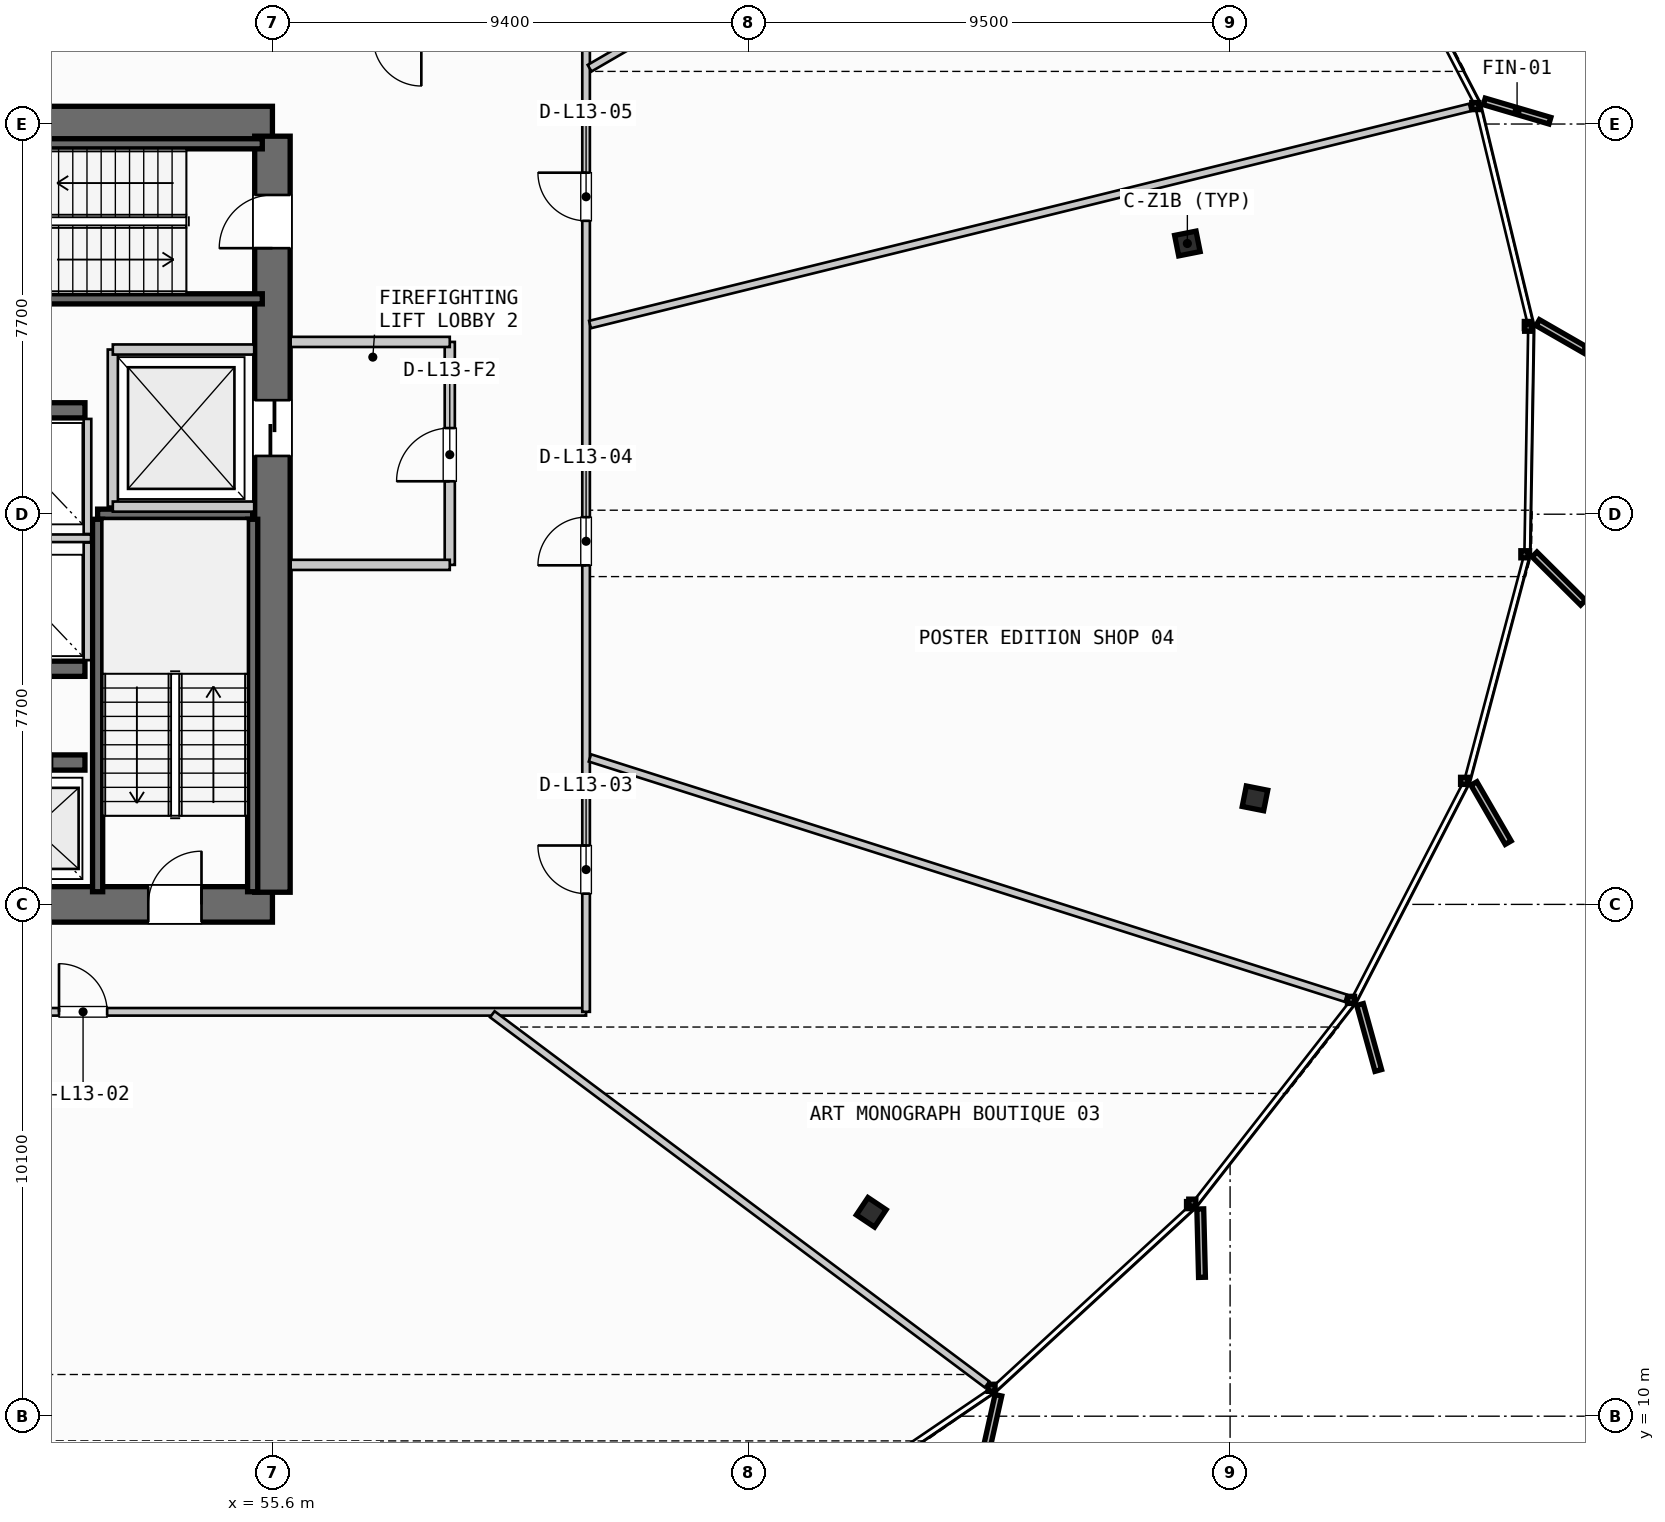
"""IFC4 building model, lengths in metres.
Left out: names, types, materials, properties, quantities, classifications, styles, units other than length and angle.
Written with IfcOpenShell. Run it as: python <this file> out.ifc"""

import sys

from ifc_helpers import new_model, si_unit, direction, frame, frame_2d, origin, origin_2d, place, context, subcontext, project, spatial, rectangle, i_section, extrude, source, transform, mapped, element, fill, save


model = new_model("IFC4")
c1 = context("Model", 3, precision=1e-05, world=origin(), true_north=direction((0.0, 1.0)))
c2 = subcontext(c1, "Body", "Model", "MODEL_VIEW")
j1 = project(units=[si_unit("LENGTHUNIT", "METRE"), si_unit("PLANEANGLEUNIT", "RADIAN")], contexts=[c1])
p1 = place(None, origin())
s1 = spatial("IfcSite", under=j1, at=p1, CompositionType="ELEMENT")
p2 = place(p1, origin())
s2 = spatial("IfcBuilding", under=s1, at=p2, CompositionType="ELEMENT")
p3 = place(p2, frame((0.0, 0.0, 56.2)))
s3 = spatial("IfcBuildingStorey", under=s2, at=p3, CompositionType="ELEMENT", Elevation=56.2)
p4 = place(p3, frame((38.0, 20.1, 0.0), z_axis=(0.0, 0.0, 1.0), x_axis=(1.0, 0.0, 0.0)))
e1 = element("IfcWall", 1, at=p4, inside=s3, PredefinedType="SHEAR", context=c2, shape_type="SweptSolid", body=[
    extrude(rectangle(XDim=17.6, YDim=0.7, at=frame_2d((8.8, 0.0))), origin(), (0.0, 0.0, 1.0), 3.55),
])
p5 = place(p4, frame((1.4, 0.0, 0.0)))
e2 = element("IfcOpeningElement", 2, at=p5, cuts=e1, PredefinedType="OPENING", context=c2, shape_type="SweptSolid", body=[
    extrude(rectangle(XDim=1.05, YDim=2.15, at=frame_2d((0.525, 1.075))), frame((0.0, 0.36, 0.0), z_axis=(0.0, -1.0, 0.0), x_axis=(1.0, 0.0, 0.0)), (0.0, 0.0, 1.0), 0.72),
])
p6 = place(p4, frame((15.15, 0.0, 0.0)))
e3 = element("IfcOpeningElement", 3, at=p6, cuts=e1, PredefinedType="OPENING", context=c2, shape_type="SweptSolid", body=[
    extrude(rectangle(XDim=1.05, YDim=2.15, at=frame_2d((0.525, 1.075))), frame((0.0, 0.36, 0.0), z_axis=(0.0, -1.0, 0.0), x_axis=(1.0, 0.0, 0.0)), (0.0, 0.0, 1.0), 0.72),
])
p7 = place(p3, frame((55.6, 35.5, 0.0), z_axis=(0.0, 0.0, 1.0), x_axis=(-1.0, 0.0, 0.0)))
e4 = element("IfcWall", 4, at=p7, inside=s3, PredefinedType="SHEAR", context=c2, shape_type="SweptSolid", body=[
    extrude(rectangle(XDim=17.6, YDim=0.7, at=frame_2d((8.8, 0.0))), origin(), (0.0, 0.0, 1.0), 3.55),
])
p8 = place(p7, frame((8.05, 0.0, 0.0)))
e5 = element("IfcOpeningElement", 5, at=p8, cuts=e4, PredefinedType="OPENING", context=c2, shape_type="SweptSolid", body=[
    extrude(rectangle(XDim=1.5, YDim=2.2, at=frame_2d((0.75, 1.1))), frame((0.0, 0.36, 0.0), z_axis=(0.0, -1.0, 0.0), x_axis=(1.0, 0.0, 0.0)), (0.0, 0.0, 1.0), 0.72),
])
p9 = place(p7, frame((14.95, 0.0, 0.0)))
e6 = element("IfcOpeningElement", 6, at=p9, cuts=e4, PredefinedType="OPENING", context=c2, shape_type="SweptSolid", body=[
    extrude(rectangle(XDim=1.4, YDim=2.3, at=frame_2d((0.7, 1.15))), frame((0.0, 0.36, 0.0), z_axis=(0.0, -1.0, 0.0), x_axis=(1.0, 0.0, 0.0)), (0.0, 0.0, 1.0), 0.72),
])
p10 = place(p7, frame((12.3, 0.0, 0.0)))
e7 = element("IfcOpeningElement", 7, at=p10, cuts=e4, PredefinedType="OPENING", context=c2, shape_type="SweptSolid", body=[
    extrude(rectangle(XDim=0.95, YDim=2.15, at=frame_2d((0.475, 1.075))), frame((0.0, 0.36, 0.0), z_axis=(0.0, -1.0, 0.0), x_axis=(1.0, 0.0, 0.0)), (0.0, 0.0, 1.0), 0.72),
])
p11 = place(p7, frame((10.2, 0.0, 0.0)))
e8 = element("IfcOpeningElement", 8, at=p11, cuts=e4, PredefinedType="OPENING", context=c2, shape_type="SweptSolid", body=[
    extrude(rectangle(XDim=0.9, YDim=2.15, at=frame_2d((0.45, 1.075))), frame((0.0, 0.36, 0.0), z_axis=(0.0, -1.0, 0.0), x_axis=(1.0, 0.0, 0.0)), (0.0, 0.0, 1.0), 0.72),
])
p12 = place(p3, frame((55.6, 20.34, 0.0), z_axis=(0.0, 0.0, 1.0), x_axis=(0.0, 1.0, 0.0)))
e9 = element("IfcWall", 9, at=p12, inside=s3, PredefinedType="SHEAR", context=c2, shape_type="SweptSolid", body=[
    extrude(rectangle(XDim=14.92, YDim=0.7, at=frame_2d((7.46, 0.0))), origin(), (0.0, 0.0, 1.0), 3.55),
])
p13 = place(p12, frame((12.71, 0.0, 0.0)))
e10 = element("IfcOpeningElement", 10, at=p13, cuts=e9, PredefinedType="OPENING", context=c2, shape_type="SweptSolid", body=[
    extrude(rectangle(XDim=1.05, YDim=2.15, at=frame_2d((0.525, 1.075))), frame((0.0, 0.36, 0.0), z_axis=(0.0, -1.0, 0.0), x_axis=(1.0, 0.0, 0.0)), (0.0, 0.0, 1.0), 0.72),
])
p14 = place(p12, frame((8.61, 0.0, 0.0)))
e11 = element("IfcOpeningElement", 11, at=p14, cuts=e9, PredefinedType="OPENING", context=c2, shape_type="SweptSolid", body=[
    extrude(rectangle(XDim=1.1, YDim=2.2, at=frame_2d((0.55, 1.1))), frame((0.0, 0.36, 0.0), z_axis=(0.0, -1.0, 0.0), x_axis=(1.0, 0.0, 0.0)), (0.0, 0.0, 1.0), 0.72),
])
p15 = place(p3, frame((47.65, 22.9, 0.0), z_axis=(0.0, 0.0, 1.0), x_axis=(1.0, 0.0, 0.0)))
e12 = element("IfcWall", 12, at=p15, inside=s3, PredefinedType="SHEAR", context=c2, shape_type="SweptSolid", body=[
    extrude(rectangle(XDim=4.25, YDim=0.3, at=frame_2d((2.125, 0.0))), origin(), (0.0, 0.0, 1.0), 3.55),
])
p16 = place(p15, frame((0.45, 0.0, 0.0)))
e13 = element("IfcOpeningElement", 13, at=p16, cuts=e12, PredefinedType="OPENING", context=c2, shape_type="SweptSolid", body=[
    extrude(rectangle(XDim=1.1, YDim=2.2, at=frame_2d((0.55, 1.1))), frame((0.0, 0.16, 0.0), z_axis=(0.0, -1.0, 0.0), x_axis=(1.0, 0.0, 0.0)), (0.0, 0.0, 1.0), 0.32),
])
p17 = place(p15, frame((2.5, 0.0, 0.0)))
e14 = element("IfcOpeningElement", 14, at=p17, cuts=e12, PredefinedType="OPENING", context=c2, shape_type="SweptSolid", body=[
    extrude(rectangle(XDim=1.1, YDim=2.2, at=frame_2d((0.55, 1.1))), frame((0.0, 0.16, 0.0), z_axis=(0.0, -1.0, 0.0), x_axis=(1.0, 0.0, 0.0)), (0.0, 0.0, 1.0), 0.32),
])
for number, where, z_axis, x_axis in (
    (15, (47.65, 24.75, 0.0), (0.0, 0.0, 1.0), (1.0, 0.0, 0.0)),
    (16, (47.65, 29.85, 0.0), (0.0, 0.0, 1.0), (1.0, 0.0, 0.0)),
):
    element("IfcWall", number, at=place(p3, frame(where, z_axis=z_axis, x_axis=x_axis)), inside=s3, PredefinedType="SHEAR", context=c2, shape_type="SweptSolid", body=[
        extrude(rectangle(XDim=4.25, YDim=0.3, at=frame_2d((2.125, 0.0))), origin(), (0.0, 0.0, 1.0), 3.55),
    ])
m1 = source(origin(), c2, "Body", "SweptSolid", [
    extrude(i_section(OverallWidth=0.412, OverallDepth=0.431, WebThickness=0.042, FlangeThickness=0.068, FilletRadius=0.015, at=origin_2d()), origin(), (0.0, 0.0, 1.0), 3.55),
])
for number, where, z_axis, x_axis in (
    (17, (73.657, 33.142, 0.0), (0.0, 0.0, 1.0), (0.981, 0.195, 0.0)),
    (18, (67.418, 14.023, 0.0), (0.0, 0.0, 1.0), (0.831, -0.556, 0.0)),
    (19, (74.991, 22.192, 0.0), (0.0, 0.0, 1.0), (0.981, -0.195, 0.0)),
):
    element("IfcColumn", number, at=place(p3, frame(where, z_axis=z_axis, x_axis=x_axis)), inside=s3, PredefinedType="COLUMN", context=c2, shape_type="MappedRepresentation", body=[
        mapped(m1, transform((0.0, 0.0, 0.0), scale=1.0)),
    ])
p18 = place(p3, frame((52.15, 27.8, 0.0), z_axis=(0.0, 0.0, 1.0), x_axis=(1.0, 0.0, 0.0)))
e20 = element("IfcWall", 20, at=p18, inside=s3, PredefinedType="SHEAR", context=c2, shape_type="SweptSolid", body=[
    extrude(rectangle(XDim=3.06, YDim=0.2, at=frame_2d((1.53, 0.0))), origin(), (0.0, 0.0, 1.0), 3.55),
])
for number, where, z_axis, x_axis in (
    (21, (55.21, 27.7, 0.0), (0.0, 0.0, 1.0), (0.0, -1.0, 0.0)),
    (22, (52.15, 20.35, 0.0), (0.0, 0.0, 1.0), (0.0, 1.0, 0.0)),
    (23, (48.05, 35.11, 0.0), (0.0, 0.0, 1.0), (1.0, 0.0, 0.0)),
    (24, (55.4, 32.05, 0.0), (0.0, 0.0, 1.0), (-1.0, 0.0, 0.0)),
):
    element("IfcWall", number, at=place(p3, frame(where, z_axis=z_axis, x_axis=x_axis)), inside=s3, PredefinedType="SHEAR", context=c2, shape_type="SweptSolid", body=[
        extrude(rectangle(XDim=7.35, YDim=0.2, at=frame_2d((3.675, 0.0))), origin(), (0.0, 0.0, 1.0), 3.55),
    ])
p19 = place(p3, frame((52.45, 27.95, 0.0), z_axis=(0.0, 0.0, 1.0), x_axis=(0.0, 1.0, 0.0)))
e25 = element("IfcWall", 25, at=p19, inside=s3, PredefinedType="PARTITIONING", context=c2, shape_type="SweptSolid", body=[
    extrude(rectangle(XDim=3.1, YDim=0.2, at=frame_2d((1.55, 0.0))), origin(), (0.0, 0.0, 1.0), 2.645),
])
for number, where, z_axis, x_axis in (
    (26, (52.45, 27.95, 0.0), (0.0, 0.0, 1.0), (1.0, 0.0, 0.0)),
    (27, (52.45, 31.05, 0.0), (0.0, 0.0, 1.0), (1.0, 0.0, 0.0)),
):
    element("IfcWall", number, at=place(p3, frame(where, z_axis=z_axis, x_axis=x_axis)), inside=s3, PredefinedType="PARTITIONING", context=c2, shape_type="SweptSolid", body=[
        extrude(rectangle(XDim=2.79, YDim=0.2, at=frame_2d((1.395, 0.0))), origin(), (0.0, 0.0, 1.0), 2.645),
    ])
p20 = place(p3, frame((59.1, 26.8, 0.0), z_axis=(0.0, 0.0, 1.0), x_axis=(0.0, 1.0, 0.0)))
e28 = element("IfcWall", 28, at=p20, inside=s3, PredefinedType="PARTITIONING", context=c2, shape_type="SweptSolid", body=[
    extrude(rectangle(XDim=4.4, YDim=0.2, at=frame_2d((2.2, 0.0))), origin(), (0.0, 0.0, 1.0), 2.645),
])
p21 = place(p20, frame((1.65, 0.0, 0.0)))
e29 = element("IfcOpeningElement", 29, at=p21, cuts=e28, PredefinedType="OPENING", context=c2, shape_type="SweptSolid", body=[
    extrude(rectangle(XDim=1.05, YDim=2.15, at=frame_2d((0.525, 1.075))), frame((0.0, 0.11, 0.0), z_axis=(0.0, -1.0, 0.0), x_axis=(1.0, 0.0, 0.0)), (0.0, 0.0, 1.0), 0.22),
])
for number, where, z_axis, x_axis in (
    (30, (55.96, 26.8, 0.0), (0.0, 0.0, 1.0), (1.0, 0.0, 0.0)),
    (31, (55.96, 31.2, 0.0), (0.0, 0.0, 1.0), (1.0, 0.0, 0.0)),
):
    element("IfcWall", number, at=place(p3, frame(where, z_axis=z_axis, x_axis=x_axis)), inside=s3, PredefinedType="PARTITIONING", context=c2, shape_type="SweptSolid", body=[
        extrude(rectangle(XDim=3.14, YDim=0.2, at=frame_2d((1.57, 0.0))), origin(), (0.0, 0.0, 1.0), 2.645),
    ])
p22 = place(p3, frame((47.7, 27.325, 0.0), z_axis=(0.0, 0.0, 1.0), x_axis=(1.0, 0.0, 0.0)))
e32 = element("IfcWall", 32, at=p22, inside=s3, PredefinedType="PARTITIONING", context=c2, shape_type="SweptSolid", body=[
    extrude(rectangle(XDim=4.32, YDim=0.15, at=frame_2d((2.16, 0.0))), origin(), (0.0, 0.0, 1.0), 2.645),
])
p23 = place(p3, frame((51.95, 24.92, 0.0), z_axis=(0.0, 0.0, 1.0), x_axis=(0.0, 1.0, 0.0)))
e33 = element("IfcWall", 33, at=p23, inside=s3, PredefinedType="PARTITIONING", context=c2, shape_type="SweptSolid", body=[
    extrude(rectangle(XDim=2.32, YDim=0.15, at=frame_2d((1.16, 0.0))), origin(), (0.0, 0.0, 1.0), 2.645),
])
p24 = place(p3, frame((51.95, 27.41, 0.0), z_axis=(0.0, 0.0, 1.0), x_axis=(0.0, 1.0, 0.0)))
e34 = element("IfcWall", 34, at=p24, inside=s3, PredefinedType="PARTITIONING", context=c2, shape_type="SweptSolid", body=[
    extrude(rectangle(XDim=2.27, YDim=0.15, at=frame_2d((1.135, 0.0))), origin(), (0.0, 0.0, 1.0), 2.645),
])
p25 = place(p3, frame((31.81, 17.98, 0.0), z_axis=(0.0, 0.0, 1.0), x_axis=(1.0, 0.0, 0.0)))
e35 = element("IfcWall", 35, at=p25, inside=s3, PredefinedType="PARTITIONING", context=c2, shape_type="SweptSolid", body=[
    extrude(rectangle(XDim=29.98, YDim=0.15, at=frame_2d((14.99, 0.0))), origin(), (0.0, 0.0, 1.0), 2.645),
])
p26 = place(p25, frame((5.749, 0.0, 0.0)))
e36 = element("IfcOpeningElement", 36, at=p26, cuts=e35, PredefinedType="OPENING", context=c2, shape_type="SweptSolid", body=[
    extrude(rectangle(XDim=0.95, YDim=2.15, at=frame_2d((0.475, 1.075))), frame((0.0, 0.085, 0.0), z_axis=(0.0, -1.0, 0.0), x_axis=(1.0, 0.0, 0.0)), (0.0, 0.0, 1.0), 0.17),
])
p27 = place(p25, frame((19.578, 0.0, 0.0)))
e37 = element("IfcOpeningElement", 37, at=p27, cuts=e35, PredefinedType="OPENING", context=c2, shape_type="SweptSolid", body=[
    extrude(rectangle(XDim=0.95, YDim=2.15, at=frame_2d((0.475, 1.075))), frame((0.0, 0.085, 0.0), z_axis=(0.0, -1.0, 0.0), x_axis=(1.0, 0.0, 0.0)), (0.0, 0.0, 1.0), 0.17),
])
p28 = place(p3, frame((61.79, 17.98, 0.0), z_axis=(0.0, 0.0, 1.0), x_axis=(0.0, 1.0, 0.0)))
e38 = element("IfcWall", 38, at=p28, inside=s3, PredefinedType="PARTITIONING", context=c2, shape_type="SweptSolid", body=[
    extrude(rectangle(XDim=19.22, YDim=0.15, at=frame_2d((9.61, 0.0))), origin(), (0.0, 0.0, 1.0), 2.645),
])
p29 = place(p28, frame((2.332, 0.0, 0.0)))
e39 = element("IfcOpeningElement", 39, at=p29, cuts=e38, PredefinedType="OPENING", context=c2, shape_type="SweptSolid", body=[
    extrude(rectangle(XDim=0.95, YDim=2.15, at=frame_2d((0.475, 1.075))), frame((0.0, 0.085, 0.0), z_axis=(0.0, -1.0, 0.0), x_axis=(1.0, 0.0, 0.0)), (0.0, 0.0, 1.0), 0.17),
])
p30 = place(p28, frame((8.811, 0.0, 0.0)))
e40 = element("IfcOpeningElement", 40, at=p30, cuts=e38, PredefinedType="OPENING", context=c2, shape_type="SweptSolid", body=[
    extrude(rectangle(XDim=0.95, YDim=2.15, at=frame_2d((0.475, 1.075))), frame((0.0, 0.085, 0.0), z_axis=(0.0, -1.0, 0.0), x_axis=(1.0, 0.0, 0.0)), (0.0, 0.0, 1.0), 0.17),
])
p31 = place(p28, frame((15.61, 0.0, 0.0)))
e41 = element("IfcOpeningElement", 41, at=p31, cuts=e38, PredefinedType="OPENING", context=c2, shape_type="SweptSolid", body=[
    extrude(rectangle(XDim=0.95, YDim=2.15, at=frame_2d((0.475, 1.075))), frame((0.0, 0.085, 0.0), z_axis=(0.0, -1.0, 0.0), x_axis=(1.0, 0.0, 0.0)), (0.0, 0.0, 1.0), 0.17),
])
p32 = place(p3, frame((59.94, 17.932, 0.0), z_axis=(0.0, 0.0, 1.0), x_axis=(0.800669778712, -0.599105921735, 0.0)))
e42 = element("IfcWall", 42, at=p32, inside=s3, PredefinedType="PARTITIONING", context=c2, shape_type="SweptSolid", body=[
    extrude(rectangle(XDim=12.195, YDim=0.15, at=frame_2d((6.097, 0.0))), origin(), (0.0, 0.0, 1.0), 2.645),
])
p33 = place(p3, frame((61.866, 22.99, 0.0), z_axis=(0.0, 0.0, 1.0), x_axis=(0.953012807574, -0.302930006107, 0.0)))
e43 = element("IfcWall", 43, at=p33, inside=s3, PredefinedType="PARTITIONING", context=c2, shape_type="SweptSolid", body=[
    extrude(rectangle(XDim=15.651, YDim=0.15, at=frame_2d((7.826, 0.0))), origin(), (0.0, 0.0, 1.0), 2.645),
])
p34 = place(p3, frame((61.868, 31.543, 0.0), z_axis=(0.0, 0.0, 1.0), x_axis=(0.970877515326, 0.23957639749, 0.0)))
e44 = element("IfcWall", 44, at=p34, inside=s3, PredefinedType="PARTITIONING", context=c2, shape_type="SweptSolid", body=[
    extrude(rectangle(XDim=17.885, YDim=0.15, at=frame_2d((8.943, 0.0))), origin(), (0.0, 0.0, 1.0), 2.645),
])
p35 = place(p3, frame((61.859, 36.602, 0.0), z_axis=(0.0, 0.0, 1.0), x_axis=(0.864825995499, 0.502071705544, 0.0)))
e45 = element("IfcWall", 45, at=p35, inside=s3, PredefinedType="PARTITIONING", context=c2, shape_type="SweptSolid", body=[
    extrude(rectangle(XDim=14.03, YDim=0.15, at=frame_2d((7.015, 0.0))), origin(), (0.0, 0.0, 1.0), 2.645),
])
m2 = source(origin(), c2, "Body", "SweptSolid", [
    extrude(rectangle(XDim=1.05, YDim=2.15, at=frame_2d((0.525, 1.075))), frame((0.0, 0.025, 0.0), z_axis=(0.0, -1.0, 0.0), x_axis=(1.0, 0.0, 0.0)), (0.0, 0.0, 1.0), 0.05),
])
p36 = place(p6, origin())
e46 = element("IfcDoor", 46, at=p36, inside=s3, OperationType="SINGLE_SWING_RIGHT", PredefinedType="DOOR", context=c2, shape_type="MappedRepresentation", body=[
    mapped(m2, transform((0.0, 0.0, 0.0), scale=1.0)),
])
fill(e3, e46)
p37 = place(p13, origin())
e47 = element("IfcDoor", 47, at=p37, inside=s3, OperationType="SINGLE_SWING_LEFT", PredefinedType="DOOR", context=c2, shape_type="MappedRepresentation", body=[
    mapped(m2, transform((0.0, 0.0, 0.0), scale=1.0)),
])
fill(e10, e47)
m3 = source(origin(), c2, "Body", "SweptSolid", [
    extrude(rectangle(XDim=1.1, YDim=2.2, at=frame_2d((0.55, 1.1))), frame((0.0, 0.025, 0.0), z_axis=(0.0, -1.0, 0.0), x_axis=(1.0, 0.0, 0.0)), (0.0, 0.0, 1.0), 0.05),
])
p38 = place(p14, origin())
e48 = element("IfcDoor", 48, at=p38, inside=s3, OperationType="SLIDING_TO_RIGHT", PredefinedType="DOOR", context=c2, shape_type="MappedRepresentation", body=[
    mapped(m3, transform((0.0, 0.0, 0.0), scale=1.0)),
])
fill(e11, e48)
p39 = place(p21, origin())
e49 = element("IfcDoor", 49, at=p39, inside=s3, OperationType="SINGLE_SWING_LEFT", PredefinedType="DOOR", context=c2, shape_type="MappedRepresentation", body=[
    mapped(m2, transform((0.0, 0.0, 0.0), scale=1.0)),
])
fill(e29, e49)
m4 = source(origin(), c2, "Body", "SweptSolid", [
    extrude(rectangle(XDim=0.95, YDim=2.15, at=frame_2d((0.475, 1.075))), frame((0.0, 0.025, 0.0), z_axis=(0.0, -1.0, 0.0), x_axis=(1.0, 0.0, 0.0)), (0.0, 0.0, 1.0), 0.05),
])
p40 = place(p27, origin())
e50 = element("IfcDoor", 50, at=p40, inside=s3, OperationType="SINGLE_SWING_LEFT", PredefinedType="DOOR", context=c2, shape_type="MappedRepresentation", body=[
    mapped(m4, transform((0.0, 0.0, 0.0), scale=1.0)),
])
fill(e37, e50)
p41 = place(p29, origin())
e51 = element("IfcDoor", 51, at=p41, inside=s3, OperationType="SINGLE_SWING_RIGHT", PredefinedType="DOOR", context=c2, shape_type="MappedRepresentation", body=[
    mapped(m4, transform((0.0, 0.0, 0.0), scale=1.0)),
])
fill(e39, e51)
p42 = place(p30, origin())
e52 = element("IfcDoor", 52, at=p42, inside=s3, OperationType="SINGLE_SWING_LEFT", PredefinedType="DOOR", context=c2, shape_type="MappedRepresentation", body=[
    mapped(m4, transform((0.0, 0.0, 0.0), scale=1.0)),
])
fill(e40, e52)
p43 = place(p31, origin())
e53 = element("IfcDoor", 53, at=p43, inside=s3, OperationType="SINGLE_SWING_RIGHT", PredefinedType="DOOR", context=c2, shape_type="MappedRepresentation", body=[
    mapped(m4, transform((0.0, 0.0, 0.0), scale=1.0)),
])
fill(e41, e53)
save(model, sys.argv[1])
